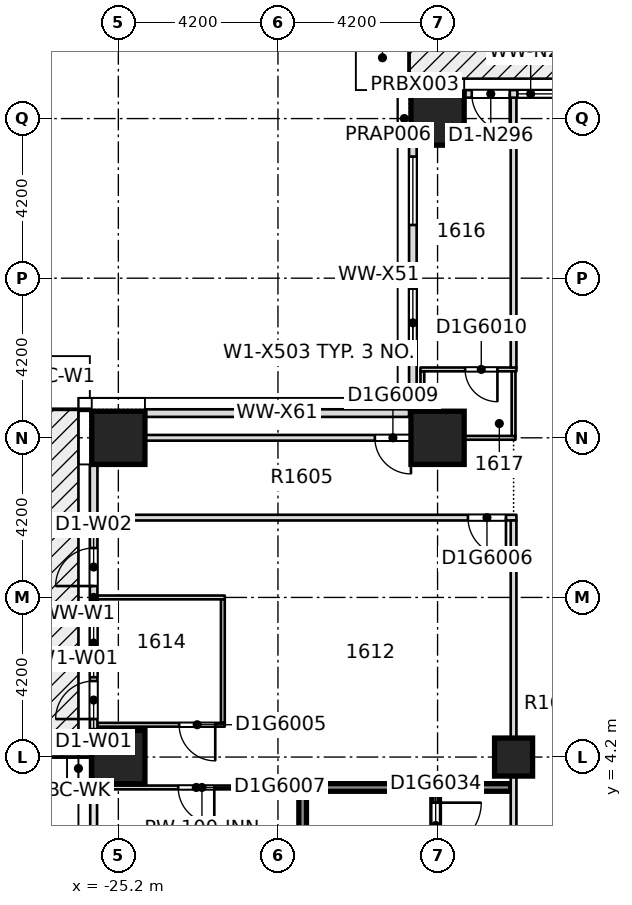
"""IFC4 building model, lengths in metres.
Left out: names, types, materials, properties, quantities, classifications, styles, units other than length and angle.
Written with IfcOpenShell. Run it as: python <this file> out.ifc"""

import sys

from ifc_helpers import new_model, si_unit, direction, frame, frame_2d, origin, origin_2d, place, context, subcontext, project, spatial, rectangle, extrude, element, fill, save


model = new_model("IFC4")
c1 = context("Model", 3, precision=1e-05, world=origin(), true_north=direction((0.0, 1.0)))
c2 = subcontext(c1, "Body", "Model", "MODEL_VIEW")
j1 = project(units=[si_unit("LENGTHUNIT", "METRE"), si_unit("PLANEANGLEUNIT", "RADIAN")], contexts=[c1])
p1 = place(None, origin())
s1 = spatial("IfcSite", under=j1, at=p1, CompositionType="ELEMENT")
p2 = place(p1, origin())
s2 = spatial("IfcBuilding", under=s1, at=p2, CompositionType="ELEMENT")
p3 = place(p2, frame((0.0, 0.0, 69.0)))
s3 = spatial("IfcBuildingStorey", under=s2, at=p3, CompositionType="ELEMENT", Elevation=69.0)
for number, where, z_axis, x_axis in (
    (1, (-25.2, 4.2, -0.32), (0.0, 0.0, 1.0), (1.0, 0.0, 0.0)),
    (2, (-25.2, 12.6, -0.32), (0.0, 0.0, 1.0), (1.0, 0.0, 0.0)),
    (3, (-16.8, 12.6, -0.32), (0.0, 0.0, 1.0), (1.0, 0.0, 0.0)),
    (4, (-16.8, 21.0, -0.32), (0.0, 0.0, 1.0), (1.0, 0.0, 0.0)),
):
    element("IfcColumn", number, at=place(p3, frame(where, z_axis=z_axis, x_axis=x_axis)), inside=s3, PredefinedType="COLUMN", context=c2, shape_type="SweptSolid", body=[
        extrude(rectangle(XDim=1.4, YDim=1.4, at=origin_2d()), origin(), (0.0, 0.0, 1.0), 3.45),
    ])
p4 = place(p3, frame((-14.8, 4.2, -0.32), z_axis=(0.0, 0.0, 1.0), x_axis=(1.0, 0.0, 0.0)))
e5 = element("IfcColumn", 5, at=p4, inside=s3, PredefinedType="COLUMN", context=c2, shape_type="SweptSolid", body=[
    extrude(rectangle(XDim=1.0, YDim=1.0, at=origin_2d()), origin(), (0.0, 0.0, 1.0), 3.45),
])
p5 = place(p3, frame((-25.75, 3.4, 0.0), z_axis=(0.0, 0.0, 1.0), x_axis=(1.0, 0.0, 0.0)))
e6 = element("IfcWall", 6, at=p5, inside=s3, PredefinedType="PARTITIONING", context=c2, shape_type="SweptSolid", body=[
    extrude(rectangle(XDim=5.5, YDim=0.1, at=frame_2d((2.75, 0.0))), origin(), (0.0, 0.0, 1.0), 3.13),
])
p6 = place(p5, frame((2.125, 0.0, 0.0)))
e7 = element("IfcOpeningElement", 7, at=p6, cuts=e6, PredefinedType="OPENING", context=c2, shape_type="SweptSolid", body=[
    extrude(rectangle(XDim=0.95, YDim=2.1, at=frame_2d((0.475, 1.05))), frame((0.0, 0.06, 0.0), z_axis=(0.0, -1.0, 0.0), x_axis=(1.0, 0.0, 0.0)), (0.0, 0.0, 1.0), 0.12),
])
p7 = place(p3, frame((-20.45, 3.4, 0.0), z_axis=(0.0, 0.0, 1.0), x_axis=(1.0, 0.0, 0.0)))
e8 = element("IfcWall", 8, at=p7, inside=s3, PredefinedType="SOLIDWALL", context=c2, shape_type="SweptSolid", body=[
    extrude(rectangle(XDim=5.575, YDim=0.2, at=frame_2d((2.788, 0.0))), origin(), (0.0, 0.0, 1.0), 3.13),
])
p8 = place(p3, frame((-25.75, 5.05, 0.0), z_axis=(0.0, 0.0, 1.0), x_axis=(1.0, 0.0, 0.0)))
e9 = element("IfcWall", 9, at=p8, inside=s3, PredefinedType="PARTITIONING", context=c2, shape_type="SweptSolid", body=[
    extrude(rectangle(XDim=3.35, YDim=0.1, at=frame_2d((1.675, 0.0))), origin(), (0.0, 0.0, 1.0), 3.13),
])
p9 = place(p8, frame((2.15, 0.0, 0.0)))
e10 = element("IfcOpeningElement", 10, at=p9, cuts=e9, PredefinedType="OPENING", context=c2, shape_type="SweptSolid", body=[
    extrude(rectangle(XDim=0.95, YDim=2.1, at=frame_2d((0.475, 1.05))), frame((0.0, 0.06, 0.0), z_axis=(0.0, -1.0, 0.0), x_axis=(1.0, 0.0, 0.0)), (0.0, 0.0, 1.0), 0.12),
])
p10 = place(p3, frame((-25.75, 8.4, 0.0), z_axis=(0.0, 0.0, 1.0), x_axis=(1.0, 0.0, 0.0)))
e11 = element("IfcWall", 11, at=p10, inside=s3, PredefinedType="PARTITIONING", context=c2, shape_type="SweptSolid", body=[
    extrude(rectangle(XDim=3.35, YDim=0.1, at=frame_2d((1.675, 0.0))), origin(), (0.0, 0.0, 1.0), 3.13),
])
p11 = place(p3, frame((-25.75, 10.5, 0.0), z_axis=(0.0, 0.0, 1.0), x_axis=(1.0, 0.0, 0.0)))
e12 = element("IfcWall", 12, at=p11, inside=s3, PredefinedType="PARTITIONING", context=c2, shape_type="SweptSolid", body=[
    extrude(rectangle(XDim=11.025, YDim=0.15, at=frame_2d((5.512, 0.0))), origin(), (0.0, 0.0, 1.0), 3.13),
])
p12 = place(p11, frame((9.75, 0.0, 0.0)))
e13 = element("IfcOpeningElement", 13, at=p12, cuts=e12, PredefinedType="OPENING", context=c2, shape_type="SweptSolid", body=[
    extrude(rectangle(XDim=1.0, YDim=2.1, at=frame_2d((0.5, 1.05))), frame((0.0, 0.085, 0.0), z_axis=(0.0, -1.0, 0.0), x_axis=(1.0, 0.0, 0.0)), (0.0, 0.0, 1.0), 0.17),
])
p13 = place(p3, frame((-25.75, 12.6, 0.0), z_axis=(0.0, 0.0, 1.0), x_axis=(1.0, 0.0, 0.0)))
e14 = element("IfcWall", 14, at=p13, inside=s3, PredefinedType="PARTITIONING", context=c2, shape_type="SweptSolid", body=[
    extrude(rectangle(XDim=1.25, YDim=0.15, at=frame_2d((0.625, 0.0))), origin(), (0.0, 0.0, 1.0), 3.13),
])
p14 = place(p3, frame((-17.25, 12.6, 0.0), z_axis=(0.0, 0.0, 1.0), x_axis=(1.0, 0.0, 0.0)))
e15 = element("IfcWall", 15, at=p14, inside=s3, PredefinedType="PARTITIONING", context=c2, shape_type="SweptSolid", body=[
    extrude(rectangle(XDim=2.5, YDim=0.1, at=frame_2d((1.25, 0.0))), origin(), (0.0, 0.0, 1.0), 3.13),
])
p15 = place(p3, frame((-17.25, 14.4, 0.0), z_axis=(0.0, 0.0, 1.0), x_axis=(1.0, 0.0, 0.0)))
e16 = element("IfcWall", 16, at=p15, inside=s3, PredefinedType="PARTITIONING", context=c2, shape_type="SweptSolid", body=[
    extrude(rectangle(XDim=2.525, YDim=0.1, at=frame_2d((1.262, 0.0))), origin(), (0.0, 0.0, 1.0), 3.13),
])
p16 = place(p15, frame((1.175, 0.0, 0.0)))
e17 = element("IfcOpeningElement", 17, at=p16, cuts=e16, PredefinedType="OPENING", context=c2, shape_type="SweptSolid", body=[
    extrude(rectangle(XDim=0.85, YDim=2.1, at=frame_2d((0.425, 1.05))), frame((0.0, 0.06, 0.0), z_axis=(0.0, -1.0, 0.0), x_axis=(1.0, 0.0, 0.0)), (0.0, 0.0, 1.0), 0.12),
])
p17 = place(p3, frame((-22.45, 5.1, 0.0), z_axis=(0.0, 0.0, 1.0), x_axis=(0.0, 1.0, 0.0)))
e18 = element("IfcWall", 18, at=p17, inside=s3, PredefinedType="PARTITIONING", context=c2, shape_type="SweptSolid", body=[
    extrude(rectangle(XDim=3.25, YDim=0.1, at=frame_2d((1.625, 0.0))), origin(), (0.0, 0.0, 1.0), 3.13),
])
p18 = place(p3, frame((-20.35, -0.83, 0.0), z_axis=(0.0, 0.0, 1.0), x_axis=(0.0, 1.0, 0.0)))
e19 = element("IfcWall", 19, at=p18, inside=s3, PredefinedType="SOLIDWALL", context=c2, shape_type="SweptSolid", body=[
    extrude(rectangle(XDim=4.13, YDim=0.2, at=frame_2d((2.065, 0.0))), origin(), (0.0, 0.0, 1.0), 3.13),
])
p19 = place(p3, frame((-17.2, 12.675, 0.0), z_axis=(0.0, 0.0, 1.0), x_axis=(0.0, 1.0, 0.0)))
e20 = element("IfcWall", 20, at=p19, inside=s3, PredefinedType="PARTITIONING", context=c2, shape_type="SweptSolid", body=[
    extrude(rectangle(XDim=1.675, YDim=0.1, at=frame_2d((0.837, 0.0))), origin(), (0.0, 0.0, 1.0), 3.13),
])
p20 = place(p3, frame((-16.85, -3.35, 0.0), z_axis=(0.0, 0.0, 1.0), x_axis=(0.0, 1.0, 0.0)))
e21 = element("IfcWall", 21, at=p20, inside=s3, PredefinedType="SOLIDWALL", context=c2, shape_type="SweptSolid", body=[
    extrude(rectangle(XDim=6.65, YDim=0.2, at=frame_2d((3.325, 0.0))), origin(), (0.0, 0.0, 1.0), 3.13),
])
p21 = place(p20, frame((5.15, 0.0, 0.0)))
e22 = element("IfcOpeningElement", 22, at=p21, cuts=e21, PredefinedType="OPENING", context=c2, shape_type="SweptSolid", body=[
    extrude(rectangle(XDim=1.2, YDim=2.1, at=frame_2d((0.6, 1.05))), frame((0.0, 0.11, 0.0), z_axis=(0.0, -1.0, 0.0), x_axis=(1.0, 0.0, 0.0)), (0.0, 0.0, 1.0), 0.22),
])
p22 = place(p3, frame((-14.8, -3.35, 0.0), z_axis=(0.0, 0.0, 1.0), x_axis=(0.0, 1.0, 0.0)))
e23 = element("IfcWall", 23, at=p22, inside=s3, PredefinedType="PARTITIONING", context=c2, shape_type="SweptSolid", body=[
    extrude(rectangle(XDim=13.775, YDim=0.15, at=frame_2d((6.888, 0.0))), origin(), (0.0, 0.0, 1.0), 3.13),
])
p23 = place(p22, frame((2.8, 0.0, 0.0)))
e24 = element("IfcOpeningElement", 24, at=p23, cuts=e23, PredefinedType="OPENING", context=c2, shape_type="SweptSolid", body=[
    extrude(rectangle(XDim=1.1, YDim=2.1, at=frame_2d((0.55, 1.05))), frame((0.0, 0.085, 0.0), z_axis=(0.0, -1.0, 0.0), x_axis=(1.0, 0.0, 0.0)), (0.0, 0.0, 1.0), 0.17),
])
p24 = place(p3, frame((-14.8, 12.65, 0.0), z_axis=(0.0, 0.0, 1.0), x_axis=(0.0, 1.0, 0.0)))
e25 = element("IfcWall", 25, at=p24, inside=s3, PredefinedType="PARTITIONING", context=c2, shape_type="SweptSolid", body=[
    extrude(rectangle(XDim=1.7, YDim=0.1, at=frame_2d((0.85, 0.0))), origin(), (0.0, 0.0, 1.0), 3.13),
])
p25 = place(p3, frame((-14.8, 14.45, 0.0), z_axis=(0.0, 0.0, 1.0), x_axis=(0.0, 1.0, 0.0)))
e26 = element("IfcWall", 26, at=p25, inside=s3, PredefinedType="PARTITIONING", context=c2, shape_type="SweptSolid", body=[
    extrude(rectangle(XDim=7.1, YDim=0.15, at=frame_2d((3.55, 0.0))), origin(), (0.0, 0.0, 1.0), 3.13),
])
p26 = place(p3, frame((-12.6, 21.65, 0.0), z_axis=(0.0, 0.0, 1.0), x_axis=(-1.0, 0.0, 0.0)))
e27 = element("IfcWall", 27, at=p26, inside=s3, PredefinedType="STANDARD", context=c2, shape_type="SweptSolid", body=[
    extrude(rectangle(XDim=3.5, YDim=0.2, at=frame_2d((1.75, 0.0))), origin(), (0.0, 0.0, 1.0), 3.13),
])
p27 = place(p26, frame((0.3, 0.0, 0.2)))
e28 = element("IfcOpeningElement", 28, at=p27, cuts=e27, PredefinedType="OPENING", context=c2, shape_type="SweptSolid", body=[
    extrude(rectangle(XDim=1.8, YDim=2.65, at=frame_2d((0.9, 1.325))), frame((0.0, 0.11, 0.0), z_axis=(0.0, -1.0, 0.0), x_axis=(1.0, 0.0, 0.0)), (0.0, 0.0, 1.0), 0.22),
])
p28 = place(p26, frame((2.3, 0.0, 0.0)))
e29 = element("IfcOpeningElement", 29, at=p28, cuts=e27, PredefinedType="OPENING", context=c2, shape_type="SweptSolid", body=[
    extrude(rectangle(XDim=1.0, YDim=2.4, at=frame_2d((0.5, 1.2))), frame((0.0, 0.11, 0.0), z_axis=(0.0, -1.0, 0.0), x_axis=(1.0, 0.0, 0.0)), (0.0, 0.0, 1.0), 0.22),
])
p29 = place(p3, frame((-17.45, 20.3, 0.0), z_axis=(0.0, 0.0, 1.0), x_axis=(0.0, -1.0, 0.0)))
e30 = element("IfcWall", 30, at=p29, inside=s3, PredefinedType="STANDARD", context=c2, shape_type="SweptSolid", body=[
    extrude(rectangle(XDim=6.95, YDim=0.2, at=frame_2d((3.475, 0.0))), origin(), (0.0, 0.0, 1.0), 3.13),
])
p30 = place(p29, frame((3.775, 0.0, 0.2)))
e31 = element("IfcOpeningElement", 31, at=p30, cuts=e30, PredefinedType="OPENING", context=c2, shape_type="SweptSolid", body=[
    extrude(rectangle(XDim=1.8, YDim=2.65, at=frame_2d((0.9, 1.325))), frame((0.0, 0.11, 0.0), z_axis=(0.0, -1.0, 0.0), x_axis=(1.0, 0.0, 0.0)), (0.0, 0.0, 1.0), 0.22),
])
p31 = place(p29, frame((0.3, 0.0, 0.2)))
e32 = element("IfcOpeningElement", 32, at=p31, cuts=e30, PredefinedType="OPENING", context=c2, shape_type="SweptSolid", body=[
    extrude(rectangle(XDim=1.8, YDim=2.65, at=frame_2d((0.9, 1.325))), frame((0.0, 0.11, 0.0), z_axis=(0.0, -1.0, 0.0), x_axis=(1.0, 0.0, 0.0)), (0.0, 0.0, 1.0), 0.22),
])
p32 = place(p3, frame((-17.55, 13.25, 0.0), z_axis=(0.0, 0.0, 1.0), x_axis=(-1.0, 0.0, 0.0)))
e33 = element("IfcWall", 33, at=p32, inside=s3, PredefinedType="STANDARD", context=c2, shape_type="SweptSolid", body=[
    extrude(rectangle(XDim=6.95, YDim=0.2, at=frame_2d((3.475, 0.0))), origin(), (0.0, 0.0, 1.0), 3.13),
])
p33 = place(p3, frame((-25.85, 11.9, 0.0), z_axis=(0.0, 0.0, 1.0), x_axis=(0.0, -1.0, 0.0)))
e34 = element("IfcWall", 34, at=p33, inside=s3, PredefinedType="STANDARD", context=c2, shape_type="SweptSolid", body=[
    extrude(rectangle(XDim=7.0, YDim=0.2, at=frame_2d((3.5, 0.0))), origin(), (0.0, 0.0, 1.0), 3.13),
])
p34 = place(p33, frame((3.8, 0.0, 0.2)))
e35 = element("IfcOpeningElement", 35, at=p34, cuts=e34, PredefinedType="OPENING", context=c2, shape_type="SweptSolid", body=[
    extrude(rectangle(XDim=1.8, YDim=2.65, at=frame_2d((0.9, 1.325))), frame((0.0, 0.11, 0.0), z_axis=(0.0, -1.0, 0.0), x_axis=(1.0, 0.0, 0.0)), (0.0, 0.0, 1.0), 0.22),
])
p35 = place(p33, frame((5.7, 0.0, 0.0)))
e36 = element("IfcOpeningElement", 36, at=p35, cuts=e34, PredefinedType="OPENING", context=c2, shape_type="SweptSolid", body=[
    extrude(rectangle(XDim=1.0, YDim=2.4, at=frame_2d((0.5, 1.2))), frame((0.0, 0.11, 0.0), z_axis=(0.0, -1.0, 0.0), x_axis=(1.0, 0.0, 0.0)), (0.0, 0.0, 1.0), 0.22),
])
p36 = place(p33, frame((2.2, 0.0, 0.0)))
e37 = element("IfcOpeningElement", 37, at=p36, cuts=e34, PredefinedType="OPENING", context=c2, shape_type="SweptSolid", body=[
    extrude(rectangle(XDim=1.0, YDim=2.4, at=frame_2d((0.5, 1.2))), frame((0.0, 0.11, 0.0), z_axis=(0.0, -1.0, 0.0), x_axis=(1.0, 0.0, 0.0)), (0.0, 0.0, 1.0), 0.22),
])
p37 = place(p3, frame((-24.5, 12.6, 0.0), z_axis=(0.0, 0.0, 1.0), x_axis=(1.0, 0.0, 0.0)))
e38 = element("IfcWall", 38, at=p37, inside=s3, PredefinedType="PARTITIONING", context=c2, shape_type="SweptSolid", body=[
    extrude(rectangle(XDim=7.1, YDim=0.15, at=frame_2d((3.55, 0.0))), origin(), (0.0, 0.0, 1.0), 2.58),
])
p38 = place(p37, frame((6.05, 0.0, 0.0)))
e39 = element("IfcOpeningElement", 39, at=p38, cuts=e38, PredefinedType="OPENING", context=c2, shape_type="SweptSolid", body=[
    extrude(rectangle(XDim=0.95, YDim=2.1, at=frame_2d((0.475, 1.05))), frame((0.0, 0.085, 0.0), z_axis=(0.0, -1.0, 0.0), x_axis=(1.0, 0.0, 0.0)), (0.0, 0.0, 1.0), 0.17),
])
p39 = place(p3, frame((-17.4, 12.6, 0.0), z_axis=(0.0, 0.0, 1.0), x_axis=(1.0, 0.0, 0.0)))
e40 = element("IfcWall", 40, at=p39, inside=s3, PredefinedType="PARTITIONING", context=c2, shape_type="SweptSolid", body=[
    extrude(rectangle(XDim=0.25, YDim=0.15, at=frame_2d((0.125, 0.0))), origin(), (0.0, 0.0, 1.0), 3.13),
])
p40 = place(p9, origin())
e41 = element("IfcDoor", 41, at=p40, inside=s3, OperationType="SINGLE_SWING_RIGHT", PredefinedType="DOOR", context=c2, shape_type="SweptSolid", body=[
    extrude(rectangle(XDim=0.95, YDim=2.1, at=frame_2d((0.475, 1.05))), frame((0.0, 0.025, 0.0), z_axis=(0.0, -1.0, 0.0), x_axis=(1.0, 0.0, 0.0)), (0.0, 0.0, 1.0), 0.05),
])
fill(e10, e41)
p41 = place(p12, origin())
e42 = element("IfcDoor", 42, at=p41, inside=s3, OperationType="SINGLE_SWING_RIGHT", PredefinedType="DOOR", context=c2, shape_type="SweptSolid", body=[
    extrude(rectangle(XDim=1.0, YDim=2.1, at=frame_2d((0.5, 1.05))), frame((0.0, 0.025, 0.0), z_axis=(0.0, -1.0, 0.0), x_axis=(1.0, 0.0, 0.0)), (0.0, 0.0, 1.0), 0.05),
])
fill(e13, e42)
p42 = place(p6, origin())
e43 = element("IfcDoor", 43, at=p42, inside=s3, OperationType="SINGLE_SWING_LEFT", PredefinedType="DOOR", context=c2, shape_type="SweptSolid", body=[
    extrude(rectangle(XDim=0.95, YDim=2.1, at=frame_2d((0.475, 1.05))), frame((0.0, 0.025, 0.0), z_axis=(0.0, -1.0, 0.0), x_axis=(1.0, 0.0, 0.0)), (0.0, 0.0, 1.0), 0.05),
])
fill(e7, e43)
p43 = place(p38, origin())
e44 = element("IfcDoor", 44, at=p43, inside=s3, OperationType="SINGLE_SWING_LEFT", PredefinedType="DOOR", context=c2, shape_type="SweptSolid", body=[
    extrude(rectangle(XDim=0.95, YDim=2.1, at=frame_2d((0.475, 1.05))), frame((0.0, 0.025, 0.0), z_axis=(0.0, -1.0, 0.0), x_axis=(1.0, 0.0, 0.0)), (0.0, 0.0, 1.0), 0.05),
])
fill(e39, e44)
p44 = place(p16, origin())
e45 = element("IfcDoor", 45, at=p44, inside=s3, OperationType="SINGLE_SWING_RIGHT", PredefinedType="DOOR", context=c2, shape_type="SweptSolid", body=[
    extrude(rectangle(XDim=0.85, YDim=2.1, at=frame_2d((0.425, 1.05))), frame((0.0, 0.025, 0.0), z_axis=(0.0, -1.0, 0.0), x_axis=(1.0, 0.0, 0.0)), (0.0, 0.0, 1.0), 0.05),
])
fill(e17, e45)
p45 = place(p21, origin())
e46 = element("IfcDoor", 46, at=p45, inside=s3, OperationType="SINGLE_SWING_RIGHT", PredefinedType="DOOR", context=c2, shape_type="SweptSolid", body=[
    extrude(rectangle(XDim=1.2, YDim=2.1, at=frame_2d((0.6, 1.05))), frame((0.0, 0.025, 0.0), z_axis=(0.0, -1.0, 0.0), x_axis=(1.0, 0.0, 0.0)), (0.0, 0.0, 1.0), 0.05),
])
fill(e22, e46)
p46 = place(p27, origin())
e47 = element("IfcWindow", 47, at=p46, inside=s3, PartitioningType="SINGLE_PANEL", PredefinedType="WINDOW", context=c2, shape_type="SweptSolid", body=[
    extrude(rectangle(XDim=1.8, YDim=2.65, at=frame_2d((0.9, 1.325))), frame((0.0, 0.03, 0.0), z_axis=(0.0, -1.0, 0.0), x_axis=(1.0, 0.0, 0.0)), (0.0, 0.0, 1.0), 0.06),
])
fill(e28, e47)
p47 = place(p28, origin())
e48 = element("IfcDoor", 48, at=p47, inside=s3, OperationType="SINGLE_SWING_LEFT", PredefinedType="DOOR", context=c2, shape_type="SweptSolid", body=[
    extrude(rectangle(XDim=1.0, YDim=2.4, at=frame_2d((0.5, 1.2))), frame((0.0, 0.025, 0.0), z_axis=(0.0, -1.0, 0.0), x_axis=(1.0, 0.0, 0.0)), (0.0, 0.0, 1.0), 0.05),
])
fill(e29, e48)
p48 = place(p30, origin())
e49 = element("IfcWindow", 49, at=p48, inside=s3, PartitioningType="SINGLE_PANEL", PredefinedType="WINDOW", context=c2, shape_type="SweptSolid", body=[
    extrude(rectangle(XDim=1.8, YDim=2.65, at=frame_2d((0.9, 1.325))), frame((0.0, 0.03, 0.0), z_axis=(0.0, -1.0, 0.0), x_axis=(1.0, 0.0, 0.0)), (0.0, 0.0, 1.0), 0.06),
])
fill(e31, e49)
p49 = place(p31, origin())
e50 = element("IfcWindow", 50, at=p49, inside=s3, PartitioningType="SINGLE_PANEL", PredefinedType="WINDOW", context=c2, shape_type="SweptSolid", body=[
    extrude(rectangle(XDim=1.8, YDim=2.65, at=frame_2d((0.9, 1.325))), frame((0.0, 0.03, 0.0), z_axis=(0.0, -1.0, 0.0), x_axis=(1.0, 0.0, 0.0)), (0.0, 0.0, 1.0), 0.06),
])
fill(e32, e50)
p50 = place(p34, origin())
e51 = element("IfcWindow", 51, at=p50, inside=s3, PartitioningType="SINGLE_PANEL", PredefinedType="WINDOW", context=c2, shape_type="SweptSolid", body=[
    extrude(rectangle(XDim=1.8, YDim=2.65, at=frame_2d((0.9, 1.325))), frame((0.0, 0.03, 0.0), z_axis=(0.0, -1.0, 0.0), x_axis=(1.0, 0.0, 0.0)), (0.0, 0.0, 1.0), 0.06),
])
fill(e35, e51)
p51 = place(p35, origin())
e52 = element("IfcDoor", 52, at=p51, inside=s3, OperationType="SINGLE_SWING_LEFT", PredefinedType="DOOR", context=c2, shape_type="SweptSolid", body=[
    extrude(rectangle(XDim=1.0, YDim=2.4, at=frame_2d((0.5, 1.2))), frame((0.0, 0.025, 0.0), z_axis=(0.0, -1.0, 0.0), x_axis=(1.0, 0.0, 0.0)), (0.0, 0.0, 1.0), 0.05),
])
fill(e36, e52)
p52 = place(p36, origin())
e53 = element("IfcDoor", 53, at=p52, inside=s3, OperationType="SINGLE_SWING_LEFT", PredefinedType="DOOR", context=c2, shape_type="SweptSolid", body=[
    extrude(rectangle(XDim=1.0, YDim=2.4, at=frame_2d((0.5, 1.2))), frame((0.0, 0.025, 0.0), z_axis=(0.0, -1.0, 0.0), x_axis=(1.0, 0.0, 0.0)), (0.0, 0.0, 1.0), 0.05),
])
fill(e37, e53)
save(model, sys.argv[1])
